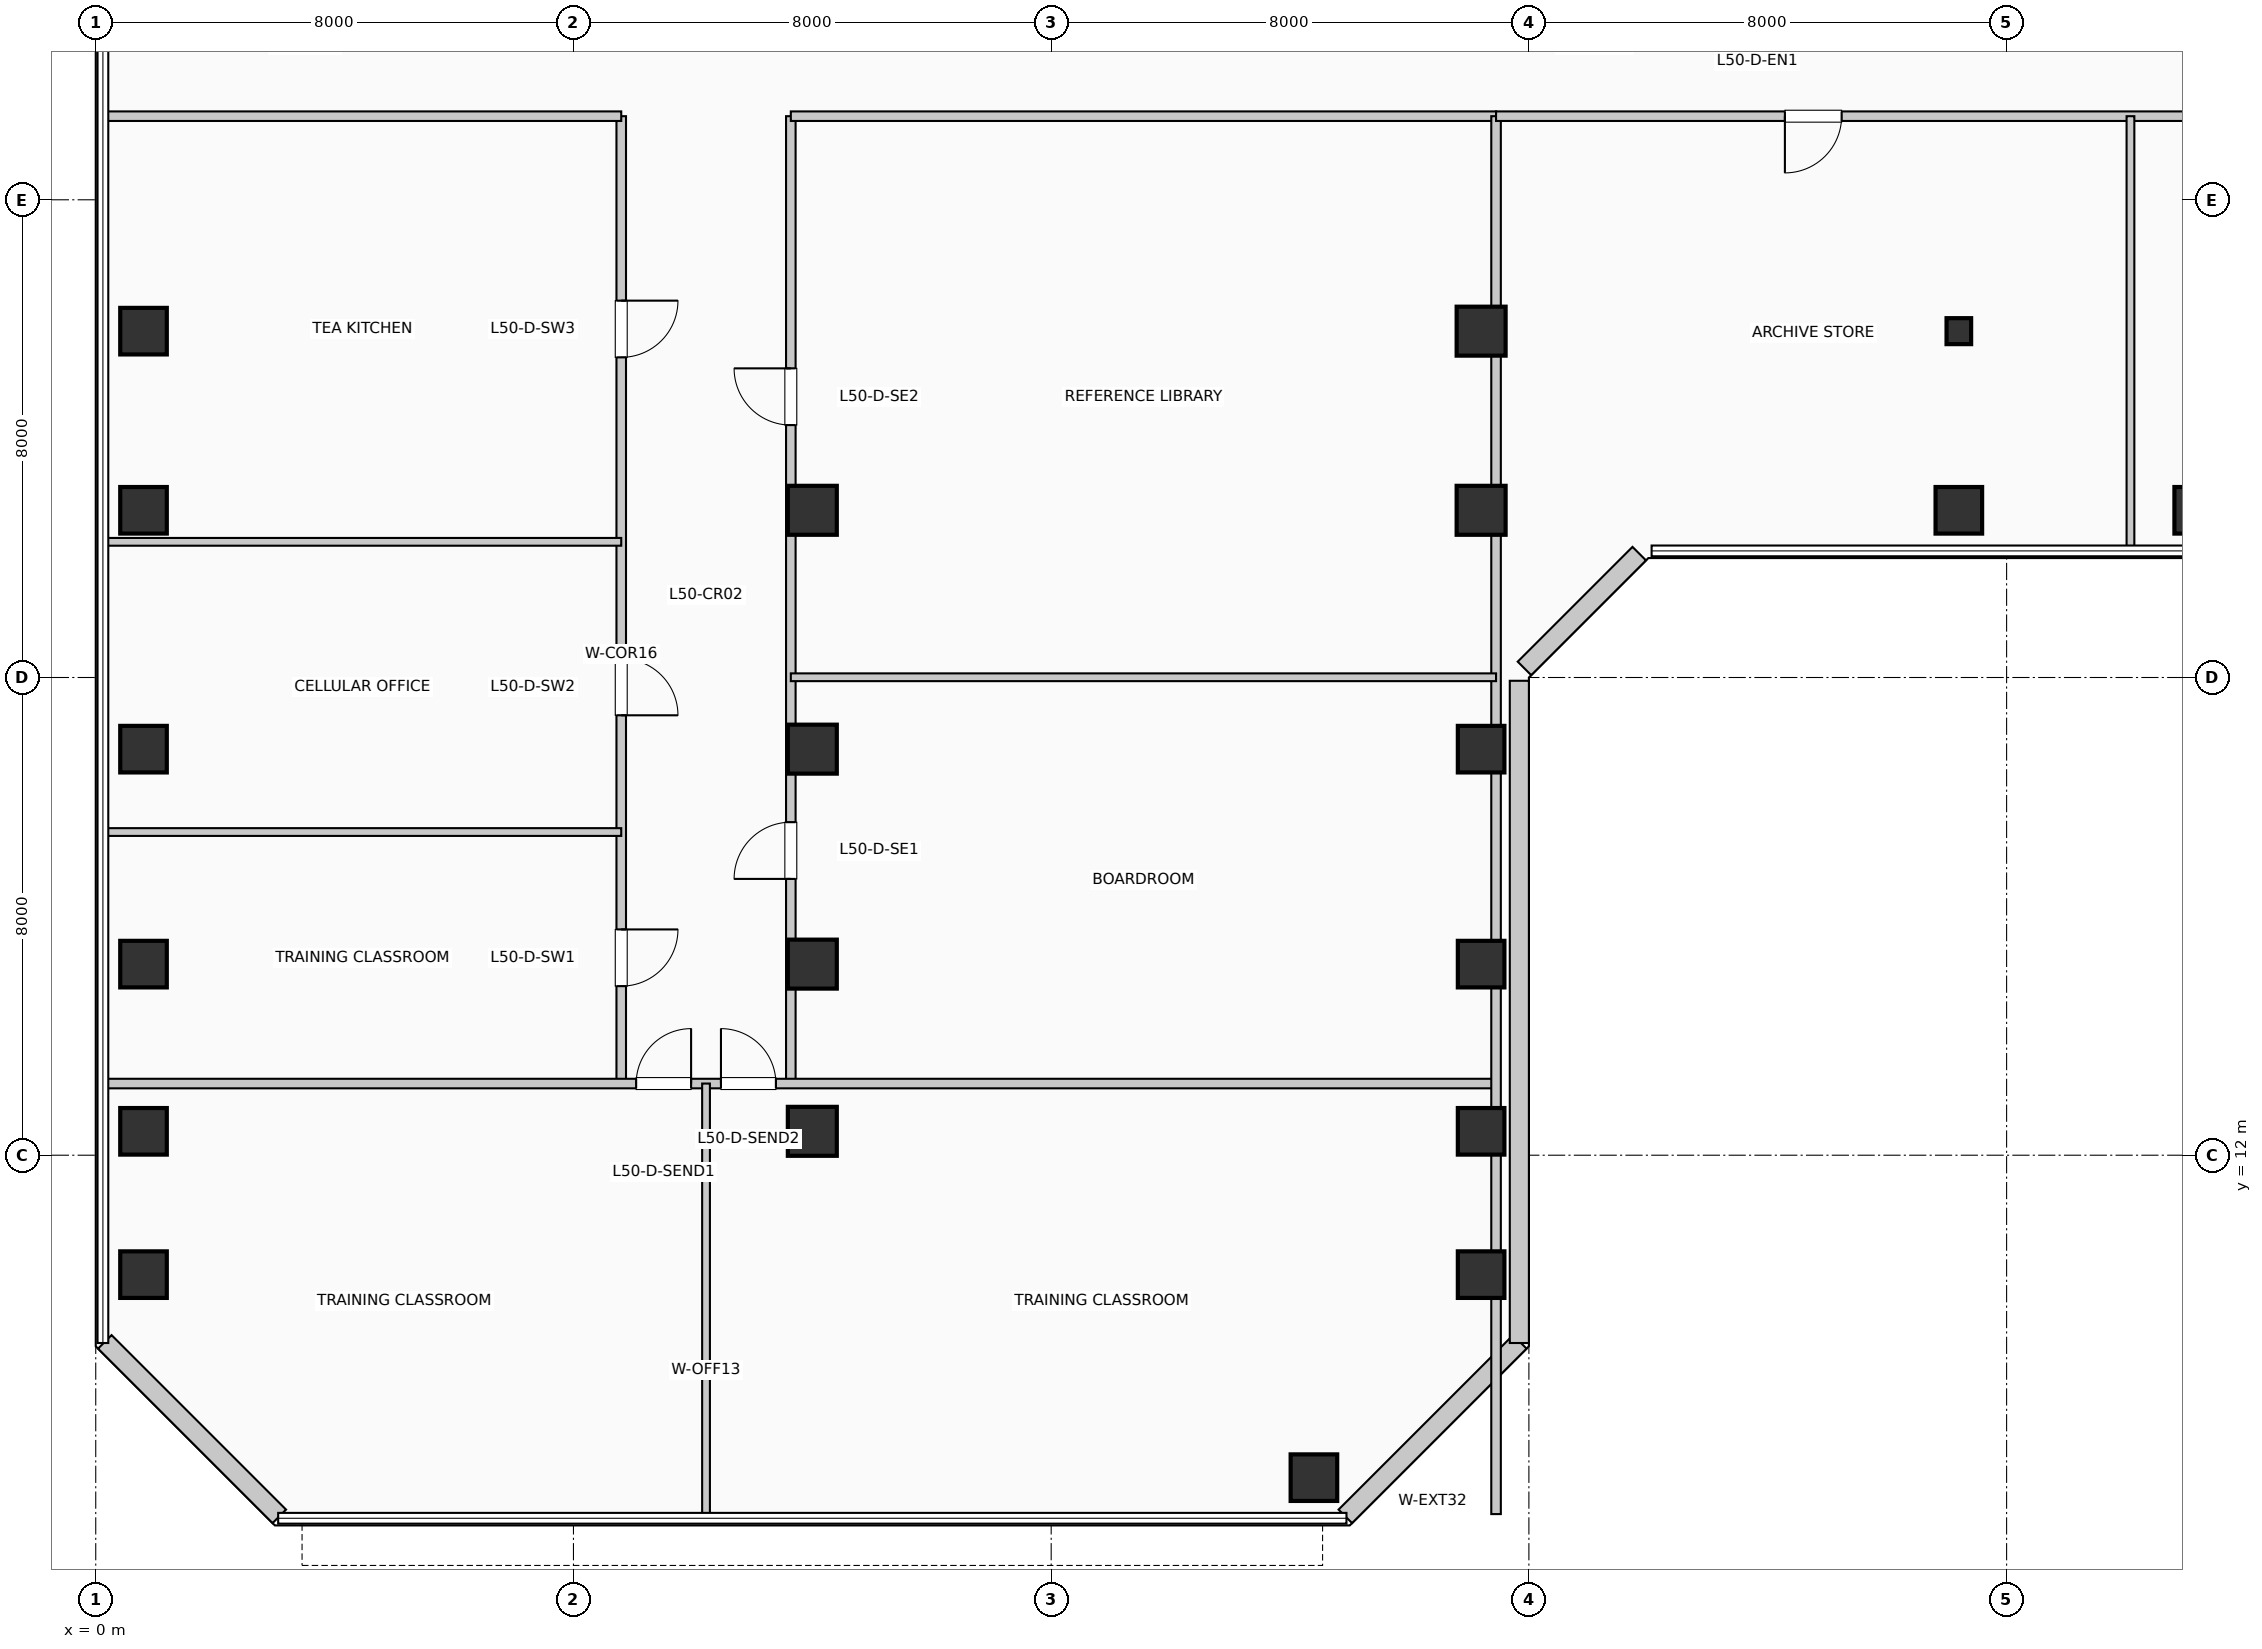
"""IFC4 building model, lengths in metres.
Left out: names, types, materials, properties, quantities, classifications, styles, units other than length and angle.
Written with IfcOpenShell. Run it as: python <this file> out.ifc"""

import sys

from ifc_helpers import new_model, si_unit, direction, frame, frame_2d, origin, origin_2d, place, context, subcontext, project, spatial, rectangle, i_section, extrude, element, fill, save


model = new_model("IFC4")
c1 = context("Model", 3, precision=1e-05, world=origin(), true_north=direction((0.0, 1.0)))
c2 = subcontext(c1, "Body", "Model", "MODEL_VIEW")
j1 = project(units=[si_unit("LENGTHUNIT", "METRE"), si_unit("PLANEANGLEUNIT", "RADIAN")], contexts=[c1])
p1 = place(None, origin())
s1 = spatial("IfcSite", under=j1, at=p1, CompositionType="ELEMENT")
p2 = place(p1, origin())
s2 = spatial("IfcBuilding", under=s1, at=p2, CompositionType="ELEMENT")
p3 = place(p2, frame((0.0, 0.0, 207.24)))
s3 = spatial("IfcBuildingStorey", under=s2, at=p3, CompositionType="ELEMENT", Elevation=207.24)
for number, where, z_axis, x_axis in (
    (1, (0.8, 10.0, 0.0), (0.0, 0.0, 1.0), (1.0, 0.0, 0.0)),
    (2, (0.8, 12.4, 0.0), (0.0, 0.0, 1.0), (1.0, 0.0, 0.0)),
    (3, (0.8, 15.2, 0.0), (0.0, 0.0, 1.0), (1.0, 0.0, 0.0)),
    (4, (0.8, 18.8, 0.0), (0.0, 0.0, 1.0), (1.0, 0.0, 0.0)),
    (5, (0.8, 22.8, 0.0), (0.0, 0.0, 1.0), (1.0, 0.0, 0.0)),
    (6, (0.8, 25.8, 0.0), (0.0, 0.0, 1.0), (1.0, 0.0, 0.0)),
):
    element("IfcColumn", number, at=place(p3, frame(where, z_axis=z_axis, x_axis=x_axis)), inside=s3, PredefinedType="COLUMN", context=c2, shape_type="SweptSolid", body=[
        extrude(rectangle(XDim=0.78, YDim=0.78, at=origin_2d()), origin(), (0.0, 0.0, 1.0), 3.96),
    ])
for number, where, z_axis, x_axis in (
    (7, (12.0, 12.4, 0.0), (0.0, 0.0, 1.0), (1.0, 0.0, 0.0)),
    (8, (12.0, 15.2, 0.0), (0.0, 0.0, 1.0), (1.0, 0.0, 0.0)),
    (9, (12.0, 18.8, 0.0), (0.0, 0.0, 1.0), (1.0, 0.0, 0.0)),
    (10, (12.0, 22.8, 0.0), (0.0, 0.0, 1.0), (1.0, 0.0, 0.0)),
):
    element("IfcColumn", number, at=place(p3, frame(where, z_axis=z_axis, x_axis=x_axis)), inside=s3, PredefinedType="COLUMN", context=c2, shape_type="SweptSolid", body=[
        extrude(rectangle(XDim=0.82, YDim=0.82, at=origin_2d()), origin(), (0.0, 0.0, 1.0), 3.96),
    ])
for number, where, z_axis, x_axis in (
    (11, (20.4, 6.6, 0.0), (0.0, 0.0, 1.0), (1.0, 0.0, 0.0)),
    (12, (23.2, 10.0, 0.0), (0.0, 0.0, 1.0), (1.0, 0.0, 0.0)),
    (13, (23.2, 12.4, 0.0), (0.0, 0.0, 1.0), (1.0, 0.0, 0.0)),
    (14, (23.2, 15.2, 0.0), (0.0, 0.0, 1.0), (1.0, 0.0, 0.0)),
    (15, (23.2, 18.8, 0.0), (0.0, 0.0, 1.0), (1.0, 0.0, 0.0)),
):
    element("IfcColumn", number, at=place(p3, frame(where, z_axis=z_axis, x_axis=x_axis)), inside=s3, PredefinedType="COLUMN", context=c2, shape_type="SweptSolid", body=[
        extrude(rectangle(XDim=0.78, YDim=0.78, at=origin_2d()), origin(), (0.0, 0.0, 1.0), 3.96),
    ])
for number, where, z_axis, x_axis in (
    (16, (23.2, 22.8, 0.0), (0.0, 0.0, 1.0), (1.0, 0.0, 0.0)),
    (17, (23.2, 25.8, 0.0), (0.0, 0.0, 1.0), (1.0, 0.0, 0.0)),
):
    element("IfcColumn", number, at=place(p3, frame(where, z_axis=z_axis, x_axis=x_axis)), inside=s3, PredefinedType="COLUMN", context=c2, shape_type="SweptSolid", body=[
        extrude(rectangle(XDim=0.82, YDim=0.82, at=origin_2d()), origin(), (0.0, 0.0, 1.0), 3.96),
    ])
p4 = place(p3, frame((31.2, 22.8, 0.0), z_axis=(0.0, 0.0, 1.0), x_axis=(1.0, 0.0, 0.0)))
e18 = element("IfcColumn", 18, at=p4, inside=s3, PredefinedType="COLUMN", context=c2, shape_type="SweptSolid", body=[
    extrude(rectangle(XDim=0.78, YDim=0.78, at=origin_2d()), origin(), (0.0, 0.0, 1.0), 3.96),
])
p5 = place(p3, frame((31.2, 25.8, 0.0), z_axis=(0.0, 0.0, 1.0), x_axis=(1.0, 0.0, 0.0)))
e19 = element("IfcColumn", 19, at=p5, inside=s3, PredefinedType="COLUMN", context=c2, shape_type="SweptSolid", body=[
    extrude(i_section(OverallWidth=0.412, OverallDepth=0.435, WebThickness=0.027, FlangeThickness=0.043, at=origin_2d()), origin(), (0.0, 0.0, 1.0), 3.96),
])
p6 = place(p3, frame((35.2, 22.8, 0.0), z_axis=(0.0, 0.0, 1.0), x_axis=(1.0, 0.0, 0.0)))
e20 = element("IfcColumn", 20, at=p6, inside=s3, PredefinedType="COLUMN", context=c2, shape_type="SweptSolid", body=[
    extrude(rectangle(XDim=0.78, YDim=0.78, at=origin_2d()), origin(), (0.0, 0.0, 1.0), 3.96),
])
p7 = place(p3, frame((20.926, 5.952, 0.0), z_axis=(0.0, 0.0, 1.0), x_axis=(0.707077242712, 0.707136318428, 0.0)))
e21 = element("IfcWall", 21, at=p7, inside=s3, PredefinedType="SOLIDWALL", context=c2, shape_type="SweptSolid", body=[
    extrude(rectangle(XDim=4.133, YDim=0.32, at=frame_2d((2.066, 0.0))), origin(), (0.0, 0.0, 1.0), 3.71),
])
p8 = place(p3, frame((23.84, 8.855, 0.0), z_axis=(0.0, 0.0, 1.0), x_axis=(0.0, 1.0, 0.0)))
e22 = element("IfcWall", 22, at=p8, inside=s3, PredefinedType="SOLIDWALL", context=c2, shape_type="SweptSolid", body=[
    extrude(rectangle(XDim=11.09, YDim=0.32, at=frame_2d((5.545, 0.0))), origin(), (0.0, 0.0, 1.0), 3.71),
])
p9 = place(p3, frame((23.926, 20.152, 0.0), z_axis=(0.0, 0.0, 1.0), x_axis=(0.707106781187, 0.707106781187, 0.0)))
e23 = element("IfcWall", 23, at=p9, inside=s3, PredefinedType="SOLIDWALL", context=c2, shape_type="SweptSolid", body=[
    extrude(rectangle(XDim=2.718, YDim=0.32, at=frame_2d((1.359, 0.0))), origin(), (0.0, 0.0, 1.0), 3.71),
])
p10 = place(p3, frame((0.152, 8.874, 0.0), z_axis=(0.0, 0.0, 1.0), x_axis=(0.707077242712, -0.707136318428, 0.0)))
e24 = element("IfcWall", 24, at=p10, inside=s3, PredefinedType="SOLIDWALL", context=c2, shape_type="SweptSolid", body=[
    extrude(rectangle(XDim=4.133, YDim=0.32, at=frame_2d((2.066, 0.0))), origin(), (0.0, 0.0, 1.0), 3.71),
])
p11 = place(p3, frame((8.8, 13.2, 0.0), z_axis=(0.0, 0.0, 1.0), x_axis=(0.0, 1.0, 0.0)))
e25 = element("IfcWall", 25, at=p11, inside=s3, PredefinedType="PARTITIONING", context=c2, shape_type="SweptSolid", body=[
    extrude(rectangle(XDim=16.2, YDim=0.16, at=frame_2d((8.1, 0.0))), origin(), (0.0, 0.0, 1.0), 3.71),
])
p12 = place(p11, frame((2.581, 0.0, 0.0), z_axis=(0.0, 0.0, 1.0), x_axis=(-1.0, 0.0, 0.0)))
e26 = element("IfcOpeningElement", 26, at=p12, cuts=e25, PredefinedType="OPENING", context=c2, shape_type="SweptSolid", body=[
    extrude(rectangle(XDim=0.95, YDim=2.15, at=frame_2d((0.475, 1.075))), frame((0.0, 0.09, 0.0), z_axis=(0.0, -1.0, 0.0), x_axis=(1.0, 0.0, 0.0)), (0.0, 0.0, 1.0), 0.18),
])
p13 = place(p11, frame((7.117, 0.0, 0.0), z_axis=(0.0, 0.0, 1.0), x_axis=(-1.0, 0.0, 0.0)))
e27 = element("IfcOpeningElement", 27, at=p13, cuts=e25, PredefinedType="OPENING", context=c2, shape_type="SweptSolid", body=[
    extrude(rectangle(XDim=0.95, YDim=2.15, at=frame_2d((0.475, 1.075))), frame((0.0, 0.09, 0.0), z_axis=(0.0, -1.0, 0.0), x_axis=(1.0, 0.0, 0.0)), (0.0, 0.0, 1.0), 0.18),
])
p14 = place(p11, frame((13.111, 0.0, 0.0), z_axis=(0.0, 0.0, 1.0), x_axis=(-1.0, 0.0, 0.0)))
e28 = element("IfcOpeningElement", 28, at=p14, cuts=e25, PredefinedType="OPENING", context=c2, shape_type="SweptSolid", body=[
    extrude(rectangle(XDim=0.95, YDim=2.15, at=frame_2d((0.475, 1.075))), frame((0.0, 0.09, 0.0), z_axis=(0.0, -1.0, 0.0), x_axis=(1.0, 0.0, 0.0)), (0.0, 0.0, 1.0), 0.18),
])
p15 = place(p3, frame((11.64, 13.2, 0.0), z_axis=(0.0, 0.0, 1.0), x_axis=(0.0, 1.0, 0.0)))
e29 = element("IfcWall", 29, at=p15, inside=s3, PredefinedType="PARTITIONING", context=c2, shape_type="SweptSolid", body=[
    extrude(rectangle(XDim=16.2, YDim=0.16, at=frame_2d((8.1, 0.0))), origin(), (0.0, 0.0, 1.0), 3.095),
])
p16 = place(p15, frame((3.427, 0.0, 0.0)))
e30 = element("IfcOpeningElement", 30, at=p16, cuts=e29, PredefinedType="OPENING", context=c2, shape_type="SweptSolid", body=[
    extrude(rectangle(XDim=0.95, YDim=2.15, at=frame_2d((0.475, 1.075))), frame((0.0, 0.09, 0.0), z_axis=(0.0, -1.0, 0.0), x_axis=(1.0, 0.0, 0.0)), (0.0, 0.0, 1.0), 0.18),
])
p17 = place(p15, frame((11.027, 0.0, 0.0)))
e31 = element("IfcOpeningElement", 31, at=p17, cuts=e29, PredefinedType="OPENING", context=c2, shape_type="SweptSolid", body=[
    extrude(rectangle(XDim=0.95, YDim=2.15, at=frame_2d((0.475, 1.075))), frame((0.0, 0.09, 0.0), z_axis=(0.0, -1.0, 0.0), x_axis=(1.0, 0.0, 0.0)), (0.0, 0.0, 1.0), 0.18),
])
p18 = place(p3, frame((0.19, 13.2, 0.0), z_axis=(0.0, 0.0, 1.0), x_axis=(1.0, 0.0, 0.0)))
e32 = element("IfcWall", 32, at=p18, inside=s3, PredefinedType="PARTITIONING", context=c2, shape_type="SweptSolid", body=[
    extrude(rectangle(XDim=23.26, YDim=0.16, at=frame_2d((11.63, 0.0))), origin(), (0.0, 0.0, 1.0), 3.71),
])
p19 = place(p18, frame((8.86, 0.0, 0.0)))
e33 = element("IfcOpeningElement", 33, at=p19, cuts=e32, PredefinedType="OPENING", context=c2, shape_type="SweptSolid", body=[
    extrude(rectangle(XDim=0.92, YDim=2.1, at=frame_2d((0.46, 1.05))), frame((0.0, 0.09, 0.0), z_axis=(0.0, -1.0, 0.0), x_axis=(1.0, 0.0, 0.0)), (0.0, 0.0, 1.0), 0.18),
])
p20 = place(p18, frame((10.28, 0.0, 0.0)))
e34 = element("IfcOpeningElement", 34, at=p20, cuts=e32, PredefinedType="OPENING", context=c2, shape_type="SweptSolid", body=[
    extrude(rectangle(XDim=0.92, YDim=2.1, at=frame_2d((0.46, 1.05))), frame((0.0, 0.09, 0.0), z_axis=(0.0, -1.0, 0.0), x_axis=(1.0, 0.0, 0.0)), (0.0, 0.0, 1.0), 0.18),
])
p21 = place(p3, frame((0.19, 29.4, 0.0), z_axis=(0.0, 0.0, 1.0), x_axis=(1.0, 0.0, 0.0)))
e35 = element("IfcWall", 35, at=p21, inside=s3, PredefinedType="PARTITIONING", context=c2, shape_type="SweptSolid", body=[
    extrude(rectangle(XDim=8.61, YDim=0.16, at=frame_2d((4.305, 0.0))), origin(), (0.0, 0.0, 1.0), 3.365),
])
p22 = place(p3, frame((11.64, 29.4, 0.0), z_axis=(0.0, 0.0, 1.0), x_axis=(1.0, 0.0, 0.0)))
e36 = element("IfcWall", 36, at=p22, inside=s3, PredefinedType="PARTITIONING", context=c2, shape_type="SweptSolid", body=[
    extrude(rectangle(XDim=11.81, YDim=0.16, at=frame_2d((5.905, 0.0))), origin(), (0.0, 0.0, 1.0), 3.365),
])
p23 = place(p3, frame((23.45, 5.99, 0.0), z_axis=(0.0, 0.0, 1.0), x_axis=(0.0, 1.0, 0.0)))
e37 = element("IfcWall", 37, at=p23, inside=s3, PredefinedType="PARTITIONING", context=c2, shape_type="SweptSolid", body=[
    extrude(rectangle(XDim=23.41, YDim=0.16, at=frame_2d((11.705, 0.0))), origin(), (0.0, 0.0, 1.0), 3.095),
])
p24 = place(p3, frame((10.22, 5.99, 0.0), z_axis=(0.0, 0.0, 1.0), x_axis=(0.0, 1.0, 0.0)))
e38 = element("IfcWall", 38, at=p24, inside=s3, PredefinedType="PARTITIONING", context=c2, shape_type="SweptSolid", body=[
    extrude(rectangle(XDim=7.21, YDim=0.13, at=frame_2d((3.605, 0.0))), origin(), (0.0, 0.0, 1.0), 3.71),
])
for number, where, z_axis, x_axis in (
    (39, (0.19, 17.412, 0.0), (0.0, 0.0, 1.0), (1.0, 0.0, 0.0)),
    (40, (0.19, 22.272, 0.0), (0.0, 0.0, 1.0), (1.0, 0.0, 0.0)),
):
    element("IfcWall", number, at=place(p3, frame(where, z_axis=z_axis, x_axis=x_axis)), inside=s3, PredefinedType="PARTITIONING", context=c2, shape_type="SweptSolid", body=[
        extrude(rectangle(XDim=8.61, YDim=0.13, at=frame_2d((4.305, 0.0))), origin(), (0.0, 0.0, 1.0), 3.71),
    ])
p25 = place(p3, frame((11.64, 20.004, 0.0), z_axis=(0.0, 0.0, 1.0), x_axis=(1.0, 0.0, 0.0)))
e41 = element("IfcWall", 41, at=p25, inside=s3, PredefinedType="PARTITIONING", context=c2, shape_type="SweptSolid", body=[
    extrude(rectangle(XDim=11.81, YDim=0.13, at=frame_2d((5.905, 0.0))), origin(), (0.0, 0.0, 1.0), 3.71),
])
p26 = place(p3, frame((23.45, 29.4, 0.0), z_axis=(0.0, 0.0, 1.0), x_axis=(1.0, 0.0, 0.0)))
e42 = element("IfcWall", 42, at=p26, inside=s3, PredefinedType="PARTITIONING", context=c2, shape_type="SweptSolid", body=[
    extrude(rectangle(XDim=26.56, YDim=0.16, at=frame_2d((13.28, 0.0))), origin(), (0.0, 0.0, 1.0), 3.365),
])
p27 = place(p26, frame((5.787, 0.0, 0.0), z_axis=(0.0, 0.0, 1.0), x_axis=(-1.0, 0.0, 0.0)))
e43 = element("IfcOpeningElement", 43, at=p27, cuts=e42, PredefinedType="OPENING", context=c2, shape_type="SweptSolid", body=[
    extrude(rectangle(XDim=0.95, YDim=2.15, at=frame_2d((0.475, 1.075))), frame((0.0, 0.09, 0.0), z_axis=(0.0, -1.0, 0.0), x_axis=(1.0, 0.0, 0.0)), (0.0, 0.0, 1.0), 0.18),
])
p28 = place(p26, frame((19.067, 0.0, 0.0), z_axis=(0.0, 0.0, 1.0), x_axis=(-1.0, 0.0, 0.0)))
e44 = element("IfcOpeningElement", 44, at=p28, cuts=e42, PredefinedType="OPENING", context=c2, shape_type="SweptSolid", body=[
    extrude(rectangle(XDim=0.95, YDim=2.15, at=frame_2d((0.475, 1.075))), frame((0.0, 0.09, 0.0), z_axis=(0.0, -1.0, 0.0), x_axis=(1.0, 0.0, 0.0)), (0.0, 0.0, 1.0), 0.18),
])
p29 = place(p3, frame((34.074, 22.19, 0.0), z_axis=(0.0, 0.0, 1.0), x_axis=(0.0, 1.0, 0.0)))
e45 = element("IfcWall", 45, at=p29, inside=s3, PredefinedType="PARTITIONING", context=c2, shape_type="SweptSolid", body=[
    extrude(rectangle(XDim=7.21, YDim=0.13, at=frame_2d((3.605, 0.0))), origin(), (0.0, 0.0, 1.0), 3.71),
])
p30 = place(p19, origin())
e46 = element("IfcDoor", 46, at=p30, inside=s3, OperationType="SINGLE_SWING_RIGHT", PredefinedType="DOOR", context=c2, shape_type="SweptSolid", body=[
    extrude(rectangle(XDim=0.92, YDim=2.1, at=frame_2d((0.46, 1.05))), frame((0.0, 0.025, 0.0), z_axis=(0.0, -1.0, 0.0), x_axis=(1.0, 0.0, 0.0)), (0.0, 0.0, 1.0), 0.05),
])
fill(e33, e46)
p31 = place(p20, origin())
e47 = element("IfcDoor", 47, at=p31, inside=s3, OperationType="SINGLE_SWING_LEFT", PredefinedType="DOOR", context=c2, shape_type="SweptSolid", body=[
    extrude(rectangle(XDim=0.92, YDim=2.1, at=frame_2d((0.46, 1.05))), frame((0.0, 0.025, 0.0), z_axis=(0.0, -1.0, 0.0), x_axis=(1.0, 0.0, 0.0)), (0.0, 0.0, 1.0), 0.05),
])
fill(e34, e47)
p32 = place(p12, origin())
e48 = element("IfcDoor", 48, at=p32, inside=s3, OperationType="SINGLE_SWING_RIGHT", PredefinedType="DOOR", context=c2, shape_type="SweptSolid", body=[
    extrude(rectangle(XDim=0.95, YDim=2.15, at=frame_2d((0.475, 1.075))), frame((0.0, 0.025, 0.0), z_axis=(0.0, -1.0, 0.0), x_axis=(1.0, 0.0, 0.0)), (0.0, 0.0, 1.0), 0.05),
])
fill(e26, e48)
p33 = place(p13, origin())
e49 = element("IfcDoor", 49, at=p33, inside=s3, OperationType="SINGLE_SWING_LEFT", PredefinedType="DOOR", context=c2, shape_type="SweptSolid", body=[
    extrude(rectangle(XDim=0.95, YDim=2.15, at=frame_2d((0.475, 1.075))), frame((0.0, 0.025, 0.0), z_axis=(0.0, -1.0, 0.0), x_axis=(1.0, 0.0, 0.0)), (0.0, 0.0, 1.0), 0.05),
])
fill(e27, e49)
p34 = place(p14, origin())
e50 = element("IfcDoor", 50, at=p34, inside=s3, OperationType="SINGLE_SWING_RIGHT", PredefinedType="DOOR", context=c2, shape_type="SweptSolid", body=[
    extrude(rectangle(XDim=0.95, YDim=2.15, at=frame_2d((0.475, 1.075))), frame((0.0, 0.025, 0.0), z_axis=(0.0, -1.0, 0.0), x_axis=(1.0, 0.0, 0.0)), (0.0, 0.0, 1.0), 0.05),
])
fill(e28, e50)
p35 = place(p16, origin())
e51 = element("IfcDoor", 51, at=p35, inside=s3, OperationType="SINGLE_SWING_LEFT", PredefinedType="DOOR", context=c2, shape_type="SweptSolid", body=[
    extrude(rectangle(XDim=0.95, YDim=2.15, at=frame_2d((0.475, 1.075))), frame((0.0, 0.025, 0.0), z_axis=(0.0, -1.0, 0.0), x_axis=(1.0, 0.0, 0.0)), (0.0, 0.0, 1.0), 0.05),
])
fill(e30, e51)
p36 = place(p17, origin())
e52 = element("IfcDoor", 52, at=p36, inside=s3, OperationType="SINGLE_SWING_RIGHT", PredefinedType="DOOR", context=c2, shape_type="SweptSolid", body=[
    extrude(rectangle(XDim=0.95, YDim=2.15, at=frame_2d((0.475, 1.075))), frame((0.0, 0.025, 0.0), z_axis=(0.0, -1.0, 0.0), x_axis=(1.0, 0.0, 0.0)), (0.0, 0.0, 1.0), 0.05),
])
fill(e31, e52)
p37 = place(p27, origin())
e53 = element("IfcDoor", 53, at=p37, inside=s3, OperationType="SINGLE_SWING_LEFT", PredefinedType="DOOR", context=c2, shape_type="SweptSolid", body=[
    extrude(rectangle(XDim=0.95, YDim=2.15, at=frame_2d((0.475, 1.075))), frame((0.0, 0.025, 0.0), z_axis=(0.0, -1.0, 0.0), x_axis=(1.0, 0.0, 0.0)), (0.0, 0.0, 1.0), 0.05),
])
fill(e43, e53)
save(model, sys.argv[1])
